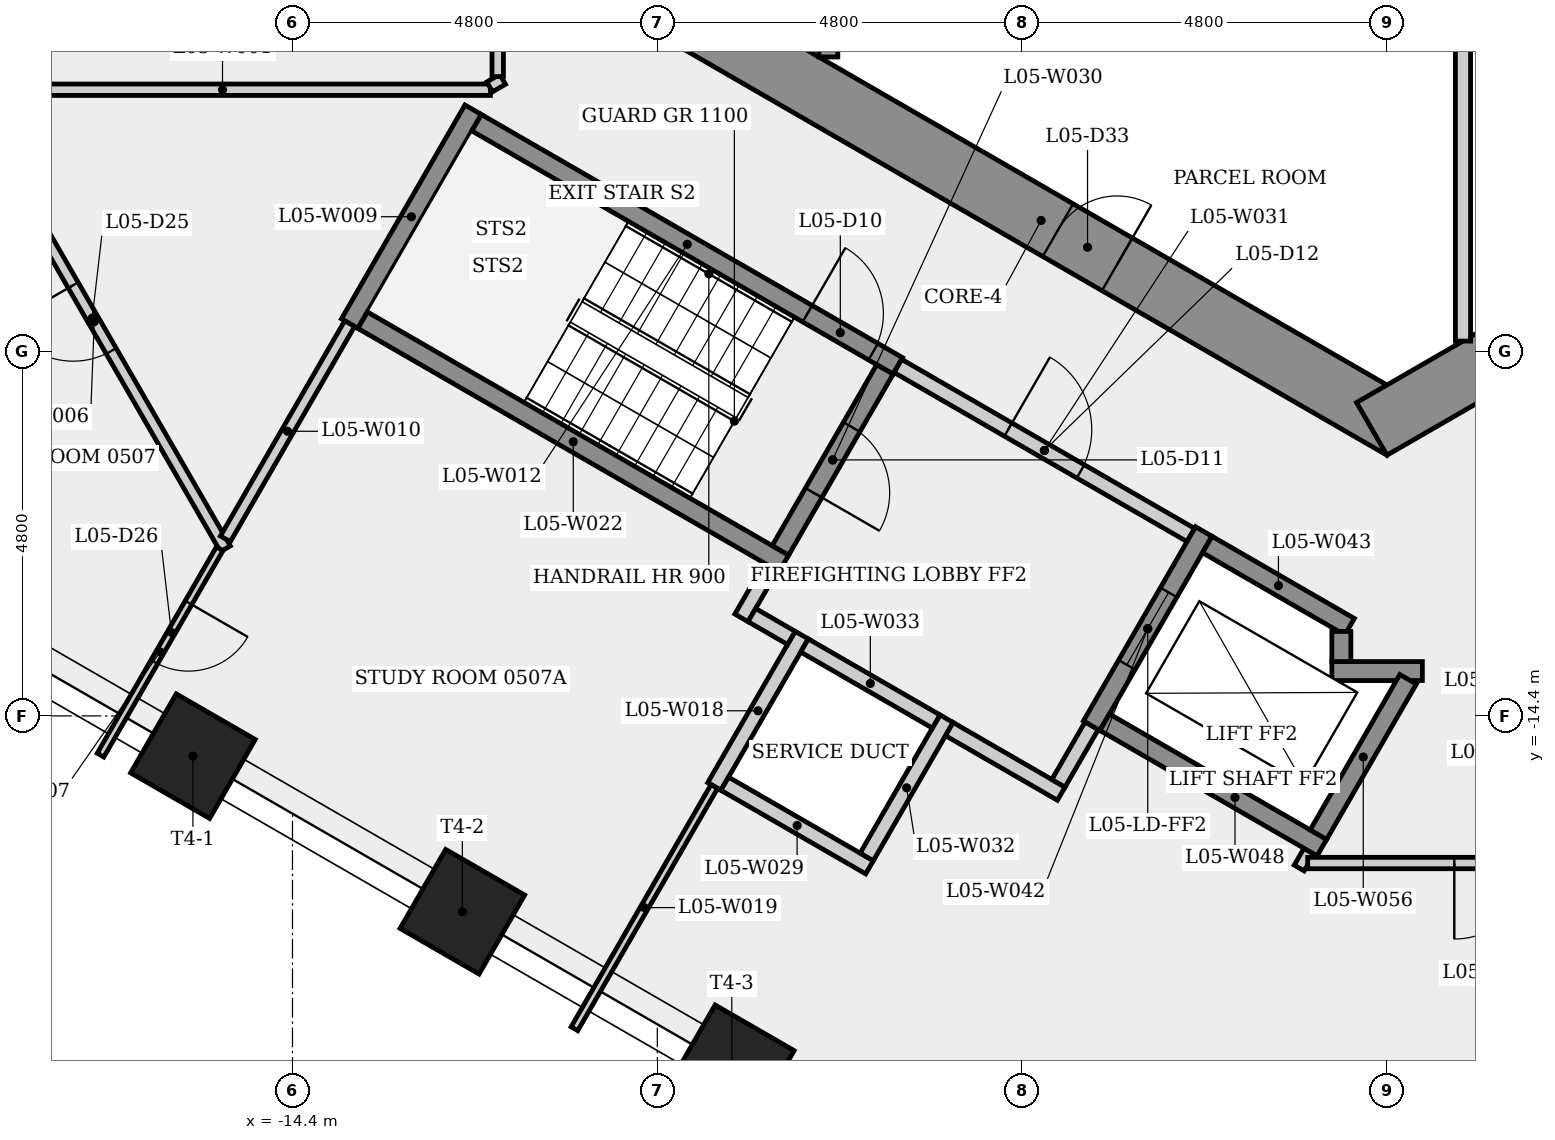
"""IFC4 building model, lengths in metres.
Left out: names, types, materials, properties, quantities, classifications, styles, units other than length and angle.
Written with IfcOpenShell. Run it as: python <this file> out.ifc"""

import sys

from ifc_helpers import new_model, si_unit, direction, frame, frame_2d, origin, origin_2d, place, context, subcontext, project, spatial, rectangle, extrude, element, fill, save


model = new_model("IFC4")
c1 = context("Model", 3, precision=1e-05, world=origin(), true_north=direction((0.0, 1.0)))
c2 = subcontext(c1, "Body", "Model", "MODEL_VIEW")
j1 = project(units=[si_unit("LENGTHUNIT", "METRE"), si_unit("PLANEANGLEUNIT", "RADIAN")], contexts=[c1])
p1 = place(None, origin())
s1 = spatial("IfcSite", under=j1, at=p1, CompositionType="ELEMENT")
p2 = place(p1, origin())
s2 = spatial("IfcBuilding", under=s1, at=p2, CompositionType="ELEMENT")
p3 = place(p2, frame((0.0, 0.0, 25.5)))
s3 = spatial("IfcBuildingStorey", under=s2, at=p3, CompositionType="ELEMENT", Elevation=25.5)
p4 = place(p3, frame((-9.3, -5.138, 0.0), z_axis=(0.0, 0.0, 1.0), x_axis=(0.866023993627, -0.500002442456, 0.0)))
e1 = element("IfcWall", 1, at=p4, inside=s3, PredefinedType="SHEAR", context=c2, shape_type="SweptSolid", body=[
    extrude(rectangle(XDim=10.97, YDim=0.8, at=frame_2d((5.485, 0.0))), origin(), (0.0, 0.0, 1.0), 3.4),
])
p5 = place(p4, frame((5.74, 0.0, 0.0)))
e2 = element("IfcOpeningElement", 2, at=p5, cuts=e1, PredefinedType="OPENING", context=c2, shape_type="SweptSolid", body=[
    extrude(rectangle(XDim=0.9, YDim=2.1, at=frame_2d((0.45, 1.05))), frame((0.0, 0.41, 0.0), z_axis=(0.0, -1.0, 0.0), x_axis=(1.0, 0.0, 0.0)), (0.0, 0.0, 1.0), 0.82),
])
p6 = place(p3, frame((-0.2, -10.623, 0.0), z_axis=(0.0, 0.0, 1.0), x_axis=(0.866023993627, 0.500002442456, 0.0)))
e3 = element("IfcWall", 3, at=p6, inside=s3, PredefinedType="SHEAR", context=c2, shape_type="SweptSolid", body=[
    extrude(rectangle(XDim=10.97, YDim=0.8, at=frame_2d((5.485, 0.0))), origin(), (0.0, 0.0, 1.0), 3.4),
])
p7 = place(p6, frame((7.224, 0.0, 0.0)))
e4 = element("IfcOpeningElement", 4, at=p7, cuts=e3, PredefinedType="OPENING", context=c2, shape_type="SweptSolid", body=[
    extrude(rectangle(XDim=0.9, YDim=2.1, at=frame_2d((0.45, 1.05))), frame((0.0, 0.41, 0.0), z_axis=(0.0, -1.0, 0.0), x_axis=(1.0, 0.0, 0.0)), (0.0, 0.0, 1.0), 0.82),
])
for number, where, z_axis, x_axis in (
    (5, (-15.71, -14.93, 0.0), (0.0, 0.0, 1.0), (-0.5, -0.866, 0.0)),
    (6, (-12.165, -16.977, 0.0), (0.0, 0.0, 1.0), (-0.5, -0.866, 0.0)),
    (7, (-8.62, -19.023, 0.0), (0.0, 0.0, 1.0), (-0.5, -0.866, 0.0)),
):
    element("IfcColumn", number, at=place(p3, frame(where, z_axis=z_axis, x_axis=x_axis)), inside=s3, PredefinedType="COLUMN", context=c2, shape_type="SweptSolid", body=[
        extrude(rectangle(XDim=1.2, YDim=1.2, at=origin_2d()), origin(), (0.0, 0.0, 1.0), 3.4),
    ])
p8 = place(p3, frame((-18.845, -6.161, 0.0), z_axis=(0.0, 0.0, 1.0), x_axis=(1.0, 0.0, 0.0)))
e8 = element("IfcWall", 8, at=p8, inside=s3, PredefinedType="PARTITIONING", context=c2, shape_type="SweptSolid", body=[
    extrude(rectangle(XDim=7.049, YDim=0.15, at=frame_2d((3.525, 0.0))), origin(), (0.0, 0.0, 1.0), 3.05),
])
p9 = place(p3, frame((-15.283, -12.201, 0.0), z_axis=(0.0, 0.0, 1.0), x_axis=(-0.500009345598, 0.866020008033, 0.0)))
e9 = element("IfcWall", 9, at=p9, inside=s3, PredefinedType="PARTITIONING", context=c2, shape_type="SweptSolid", body=[
    extrude(rectangle(XDim=6.9, YDim=0.15, at=frame_2d((3.45, 0.0))), origin(), (0.0, 0.0, 1.0), 3.05),
])
p10 = place(p9, frame((3.005, 0.0, 0.0)))
e10 = element("IfcOpeningElement", 10, at=p10, cuts=e9, PredefinedType="OPENING", context=c2, shape_type="SweptSolid", body=[
    extrude(rectangle(XDim=1.0, YDim=2.1, at=frame_2d((0.5, 1.05))), frame((0.0, 0.085, 0.0), z_axis=(0.0, -1.0, 0.0), x_axis=(1.0, 0.0, 0.0)), (0.0, 0.0, 1.0), 0.17),
])
p11 = place(p3, frame((-15.358, -12.201, 0.0), z_axis=(0.0, 0.0, 1.0), x_axis=(-0.500041479787, -0.866001454094, 0.0)))
e11 = element("IfcWall", 11, at=p11, inside=s3, PredefinedType="PARTITIONING", context=c2, shape_type="SweptSolid", body=[
    extrude(rectangle(XDim=3.135, YDim=0.1, at=frame_2d((1.568, 0.0))), origin(), (0.0, 0.0, 1.0), 3.05),
])
p12 = place(p11, frame((0.82, 0.0, 0.0)))
e12 = element("IfcOpeningElement", 12, at=p12, cuts=e11, PredefinedType="OPENING", context=c2, shape_type="SweptSolid", body=[
    extrude(rectangle(XDim=0.9, YDim=2.1, at=frame_2d((0.45, 1.05))), frame((0.0, 0.06, 0.0), z_axis=(0.0, -1.0, 0.0), x_axis=(1.0, 0.0, 0.0)), (0.0, 0.0, 1.0), 0.12),
])
p13 = place(p3, frame((-13.648, -9.239, 0.0), z_axis=(0.0, 0.0, 1.0), x_axis=(0.500017246033, 0.866015446554, 0.0)))
e13 = element("IfcWall", 13, at=p13, inside=s3, PredefinedType="SHEAR", context=c2, shape_type="SweptSolid", body=[
    extrude(rectangle(XDim=3.25, YDim=0.25, at=frame_2d((1.625, 0.0))), origin(), (0.0, 0.0, 1.0), 3.05),
])
p14 = place(p3, frame((-13.648, -9.239, 0.0), z_axis=(0.0, 0.0, 1.0), x_axis=(-0.50004125829, -0.866001581989, 0.0)))
e14 = element("IfcWall", 14, at=p14, inside=s3, PredefinedType="PARTITIONING", context=c2, shape_type="SweptSolid", body=[
    extrude(rectangle(XDim=3.27, YDim=0.15, at=frame_2d((1.635, 0.0))), origin(), (0.0, 0.0, 1.0), 3.05),
])
p15 = place(p3, frame((-11.977, -6.595, 0.0), z_axis=(0.0, 0.0, 1.0), x_axis=(0.866025499775, -0.499999833739, 0.0)))
e15 = element("IfcWall", 15, at=p15, inside=s3, PredefinedType="SHEAR", context=c2, shape_type="SweptSolid", body=[
    extrude(rectangle(XDim=6.4, YDim=0.25, at=frame_2d((3.2, 0.0))), origin(), (0.0, 0.0, 1.0), 3.05),
])
p16 = place(p15, frame((5.025, 0.0, 0.0)))
e16 = element("IfcOpeningElement", 16, at=p16, cuts=e15, PredefinedType="OPENING", context=c2, shape_type="SweptSolid", body=[
    extrude(rectangle(XDim=1.0, YDim=2.1, at=frame_2d((0.5, 1.05))), frame((0.0, 0.135, 0.0), z_axis=(0.0, -1.0, 0.0), x_axis=(1.0, 0.0, 0.0)), (0.0, 0.0, 1.0), 0.27),
])
p17 = place(p3, frame((-11.806, -6.123, 0.0), z_axis=(0.0, 0.0, 1.0), x_axis=(0.866103179807, 0.499865263774, 0.0)))
e17 = element("IfcWall", 17, at=p17, inside=s3, PredefinedType="PARTITIONING", context=c2, shape_type="SweptSolid", body=[
    extrude(rectangle(XDim=0.197, YDim=0.15, at=frame_2d((0.099, 0.0))), origin(), (0.0, 0.0, 1.0), 3.05),
])
p18 = place(p3, frame((-11.7, -5.987, 0.0), z_axis=(0.0, 0.0, 1.0), x_axis=(0.0, 1.0, 0.0)))
e18 = element("IfcWall", 18, at=p18, inside=s3, PredefinedType="PARTITIONING", context=c2, shape_type="SweptSolid", body=[
    extrude(rectangle(XDim=11.732, YDim=0.15, at=frame_2d((5.866, 0.0))), origin(), (0.0, 0.0, 1.0), 3.05),
])
p19 = place(p18, frame((5.366, 0.0, 0.0)))
e19 = element("IfcOpeningElement", 19, at=p19, cuts=e18, PredefinedType="OPENING", context=c2, shape_type="SweptSolid", body=[
    extrude(rectangle(XDim=1.0, YDim=2.1, at=frame_2d((0.5, 1.05))), frame((0.0, 0.085, 0.0), z_axis=(0.0, -1.0, 0.0), x_axis=(1.0, 0.0, 0.0)), (0.0, 0.0, 1.0), 0.17),
])
p20 = place(p3, frame((-8.85, -15.329, 0.0), z_axis=(0.0, 0.0, 1.0), x_axis=(0.500077740698, 0.865980515519, 0.0)))
e20 = element("IfcWall", 20, at=p20, inside=s3, PredefinedType="PLUMBINGWALL", context=c2, shape_type="SweptSolid", body=[
    extrude(rectangle(XDim=2.3, YDim=0.2, at=frame_2d((1.15, 0.0))), origin(), (0.0, 0.0, 1.0), 3.05),
])
p21 = place(p3, frame((-8.85, -15.329, 0.0), z_axis=(0.0, 0.0, 1.0), x_axis=(-0.499955964762, -0.866050826049, 0.0)))
e21 = element("IfcWall", 21, at=p21, inside=s3, PredefinedType="PARTITIONING", context=c2, shape_type="SweptSolid", body=[
    extrude(rectangle(XDim=3.68, YDim=0.1, at=frame_2d((1.84, 0.0))), origin(), (0.0, 0.0, 1.0), 3.05),
])
p22 = place(p3, frame((-8.493, -13.11, 0.0), z_axis=(0.0, 0.0, 1.0), x_axis=(0.500067724834, 0.865986299303, 0.0)))
e22 = element("IfcWall", 22, at=p22, inside=s3, PredefinedType="PARTITIONING", context=c2, shape_type="SweptSolid", body=[
    extrude(rectangle(XDim=0.775, YDim=0.2, at=frame_2d((0.388, 0.0))), origin(), (0.0, 0.0, 1.0), 3.05),
])
p23 = place(p3, frame((-7.935, -12.393, 0.0), z_axis=(0.0, 0.0, 1.0), x_axis=(-0.866025499775, 0.499999833739, 0.0)))
e23 = element("IfcWall", 23, at=p23, inside=s3, PredefinedType="SHEAR", context=c2, shape_type="SweptSolid", body=[
    extrude(rectangle(XDim=6.4, YDim=0.25, at=frame_2d((3.2, 0.0))), origin(), (0.0, 0.0, 1.0), 3.05),
])
p24 = place(p3, frame((-7.836, -13.373, 0.0), z_axis=(0.0, 0.0, 1.0), x_axis=(-0.866232998003, 0.499640263761, 0.0)))
e24 = element("IfcWall", 24, at=p24, inside=s3, PredefinedType="PARTITIONING", context=c2, shape_type="SweptSolid", body=[
    extrude(rectangle(XDim=0.6, YDim=0.2, at=frame_2d((0.3, 0.0))), origin(), (0.0, 0.0, 1.0), 3.05),
])
p25 = place(p3, frame((-7.35, -5.73, 0.0), z_axis=(0.0, 0.0, 1.0), x_axis=(0.0, 1.0, 0.0)))
e25 = element("IfcWall", 25, at=p25, inside=s3, PredefinedType="SHEAR", context=c2, shape_type="SweptSolid", body=[
    extrude(rectangle(XDim=4.055, YDim=0.25, at=frame_2d((2.028, 0.0))), origin(), (0.0, 0.0, 1.0), 3.05),
])
p26 = place(p3, frame((-6.808, -16.392, 0.0), z_axis=(0.0, 0.0, 1.0), x_axis=(-0.866008176907, 0.50002983664, 0.0)))
e26 = element("IfcWall", 26, at=p26, inside=s3, PredefinedType="PLUMBINGWALL", context=c2, shape_type="SweptSolid", body=[
    extrude(rectangle(XDim=2.2, YDim=0.2, at=frame_2d((1.1, 0.0))), origin(), (0.0, 0.0, 1.0), 3.05),
])
p27 = place(p3, frame((-6.605, -9.841, 0.0), z_axis=(0.0, 0.0, 1.0), x_axis=(-0.499996545922, -0.866027397988, 0.0)))
e27 = element("IfcWall", 27, at=p27, inside=s3, PredefinedType="SHEAR", context=c2, shape_type="SweptSolid", body=[
    extrude(rectangle(XDim=2.75, YDim=0.25, at=frame_2d((1.375, 0.0))), origin(), (0.0, 0.0, 1.0), 3.05),
])
p28 = place(p27, frame((0.875, 0.0, 0.0)))
e28 = element("IfcOpeningElement", 28, at=p28, cuts=e27, PredefinedType="OPENING", context=c2, shape_type="SweptSolid", body=[
    extrude(rectangle(XDim=1.0, YDim=2.1, at=frame_2d((0.5, 1.05))), frame((0.0, 0.135, 0.0), z_axis=(0.0, -1.0, 0.0), x_axis=(1.0, 0.0, 0.0)), (0.0, 0.0, 1.0), 0.27),
])
p29 = place(p3, frame((-6.435, -9.795, 0.0), z_axis=(0.0, 0.0, 1.0), x_axis=(0.866012907634, -0.500021643343, 0.0)))
e29 = element("IfcWall", 29, at=p29, inside=s3, PredefinedType="PARTITIONING", context=c2, shape_type="SweptSolid", body=[
    extrude(rectangle(XDim=4.45, YDim=0.2, at=frame_2d((2.225, 0.0))), origin(), (0.0, 0.0, 1.0), 3.05),
])
p30 = place(p29, frame((1.675, 0.0, 0.0)))
e30 = element("IfcOpeningElement", 30, at=p30, cuts=e29, PredefinedType="OPENING", context=c2, shape_type="SweptSolid", body=[
    extrude(rectangle(XDim=1.1, YDim=2.1, at=frame_2d((0.55, 1.05))), frame((0.0, 0.11, 0.0), z_axis=(0.0, -1.0, 0.0), x_axis=(1.0, 0.0, 0.0)), (0.0, 0.0, 1.0), 0.22),
])
p31 = place(p3, frame((-5.795, -14.437, 0.0), z_axis=(0.0, 0.0, 1.0), x_axis=(-0.500027713859, -0.866009402589, 0.0)))
e31 = element("IfcWall", 31, at=p31, inside=s3, PredefinedType="PLUMBINGWALL", context=c2, shape_type="SweptSolid", body=[
    extrude(rectangle(XDim=2.1, YDim=0.2, at=frame_2d((1.05, 0.0))), origin(), (0.0, 0.0, 1.0), 3.05),
])
p32 = place(p3, frame((-5.931, -14.473, 0.0), z_axis=(0.0, 0.0, 1.0), x_axis=(-0.866041268327, 0.499972520799, 0.0)))
e32 = element("IfcWall", 32, at=p32, inside=s3, PredefinedType="PLUMBINGWALL", context=c2, shape_type="SweptSolid", body=[
    extrude(rectangle(XDim=2.0, YDim=0.2, at=frame_2d((1.0, 0.0))), origin(), (0.0, 0.0, 1.0), 3.05),
])
p33 = place(p3, frame((-4.286, -15.423, 0.0), z_axis=(0.0, 0.0, 1.0), x_axis=(-0.866025371046, 0.500000056704, 0.0)))
e33 = element("IfcWall", 33, at=p33, inside=s3, PredefinedType="PARTITIONING", context=c2, shape_type="SweptSolid", body=[
    extrude(rectangle(XDim=1.7, YDim=0.2, at=frame_2d((0.85, 0.0))), origin(), (0.0, 0.0, 1.0), 3.05),
])
p34 = place(p3, frame((-3.885, -14.529, 0.0), z_axis=(0.0, 0.0, 1.0), x_axis=(-0.499859285417, -0.866106630146, 0.0)))
e34 = element("IfcWall", 34, at=p34, inside=s3, PredefinedType="PARTITIONING", context=c2, shape_type="SweptSolid", body=[
    extrude(rectangle(XDim=0.875, YDim=0.2, at=frame_2d((0.438, 0.0))), origin(), (0.0, 0.0, 1.0), 3.05),
])
p35 = place(p3, frame((-2.41, -11.974, 0.0), z_axis=(0.0, 0.0, 1.0), x_axis=(-0.500001826776, -0.866024349092, 0.0)))
e35 = element("IfcWall", 35, at=p35, inside=s3, PredefinedType="SHEAR", context=c2, shape_type="SweptSolid", body=[
    extrude(rectangle(XDim=2.95, YDim=0.25, at=frame_2d((1.475, 0.0))), origin(), (0.0, 0.0, 1.0), 3.05),
])
p36 = place(p35, frame((0.925, 0.0, 0.0)))
e36 = element("IfcOpeningElement", 36, at=p36, cuts=e35, PredefinedType="OPENING", context=c2, shape_type="SweptSolid", body=[
    extrude(rectangle(XDim=1.1, YDim=2.1, at=frame_2d((0.55, 1.05))), frame((0.0, 0.135, 0.0), z_axis=(0.0, -1.0, 0.0), x_axis=(1.0, 0.0, 0.0)), (0.0, 0.0, 1.0), 0.27),
])
p37 = place(p3, frame((-2.364, -12.145, 0.0), z_axis=(0.0, 0.0, 1.0), x_axis=(0.86603892542, -0.499976579108, 0.0)))
e37 = element("IfcWall", 37, at=p37, inside=s3, PredefinedType="SHEAR", context=c2, shape_type="SweptSolid", body=[
    extrude(rectangle(XDim=2.162, YDim=0.25, at=frame_2d((1.081, 0.0))), origin(), (0.0, 0.0, 1.0), 3.05),
])
p38 = place(p3, frame((-1.155, -16.401, 0.0), z_axis=(0.0, 0.0, 1.0), x_axis=(0.500134748329, 0.865947592822, 0.0)))
e38 = element("IfcWall", 38, at=p38, inside=s3, PredefinedType="PARTITIONING", context=c2, shape_type="SweptSolid", body=[
    extrude(rectangle(XDim=0.256, YDim=0.15, at=frame_2d((0.128, 0.0))), origin(), (0.0, 0.0, 1.0), 3.05),
])
p39 = place(p3, frame((-0.856, -16.133, 0.0), z_axis=(0.0, 0.0, 1.0), x_axis=(-0.866021716278, 0.500006386895, 0.0)))
e39 = element("IfcWall", 39, at=p39, inside=s3, PredefinedType="SHEAR", context=c2, shape_type="SweptSolid", body=[
    extrude(rectangle(XDim=3.3, YDim=0.25, at=frame_2d((1.65, 0.0))), origin(), (0.0, 0.0, 1.0), 3.05),
])
p40 = place(p3, frame((-0.725, -13.81, 0.0), z_axis=(0.0, 0.0, 1.0), x_axis=(1.0, 0.0, 0.0)))
e40 = element("IfcWall", 40, at=p40, inside=s3, PredefinedType="SHEAR", context=c2, shape_type="SweptSolid", body=[
    extrude(rectangle(XDim=1.191, YDim=0.25, at=frame_2d((0.595, 0.0))), origin(), (0.0, 0.0, 1.0), 3.05),
])
p41 = place(p3, frame((-0.6, -13.289, 0.0), z_axis=(0.0, 0.0, 1.0), x_axis=(0.0, -1.0, 0.0)))
e41 = element("IfcWall", 41, at=p41, inside=s3, PredefinedType="SHEAR", context=c2, shape_type="SweptSolid", body=[
    extrude(rectangle(XDim=0.396, YDim=0.25, at=frame_2d((0.198, 0.0))), origin(), (0.0, 0.0, 1.0), 3.4),
])
p42 = place(p3, frame((0.278, -13.918, 0.0), z_axis=(0.0, 0.0, 1.0), x_axis=(-0.49998806882, -0.866032292145, 0.0)))
e42 = element("IfcWall", 42, at=p42, inside=s3, PredefinedType="SHEAR", context=c2, shape_type="SweptSolid", body=[
    extrude(rectangle(XDim=2.36, YDim=0.25, at=frame_2d((1.18, 0.0))), origin(), (0.0, 0.0, 1.0), 3.4),
])
p43 = place(p3, frame((1.0, -5.275, 0.0), z_axis=(0.0, 0.0, 1.0), x_axis=(0.0, -1.0, 0.0)))
e43 = element("IfcWall", 43, at=p43, inside=s3, PredefinedType="PARTITIONING", context=c2, shape_type="SweptSolid", body=[
    extrude(rectangle(XDim=4.194, YDim=0.2, at=frame_2d((2.097, 0.0))), origin(), (0.0, 0.0, 1.0), 3.05),
])
p44 = place(p3, frame((3.814, -16.336, 0.0), z_axis=(0.0, 0.0, 1.0), x_axis=(-1.0, 0.0, 0.0)))
e44 = element("IfcWall", 44, at=p44, inside=s3, PredefinedType="PARTITIONING", context=c2, shape_type="SweptSolid", body=[
    extrude(rectangle(XDim=4.857, YDim=0.15, at=frame_2d((2.428, 0.0))), origin(), (0.0, 0.0, 1.0), 3.05),
])
p45 = place(p44, frame((1.928, 0.0, 0.0)))
e45 = element("IfcOpeningElement", 45, at=p45, cuts=e44, PredefinedType="OPENING", context=c2, shape_type="SweptSolid", body=[
    extrude(rectangle(XDim=1.0, YDim=2.1, at=frame_2d((0.5, 1.05))), frame((0.0, 0.085, 0.0), z_axis=(0.0, -1.0, 0.0), x_axis=(1.0, 0.0, 0.0)), (0.0, 0.0, 1.0), 0.17),
])
p46 = place(p16, origin())
e46 = element("IfcDoor", 46, at=p46, inside=s3, OperationType="SINGLE_SWING_LEFT", PredefinedType="DOOR", context=c2, shape_type="SweptSolid", body=[
    extrude(rectangle(XDim=1.0, YDim=2.1, at=frame_2d((0.5, 1.05))), frame((0.0, 0.025, 0.0), z_axis=(0.0, -1.0, 0.0), x_axis=(1.0, 0.0, 0.0)), (0.0, 0.0, 1.0), 0.05),
])
fill(e16, e46)
p47 = place(p28, origin())
e47 = element("IfcDoor", 47, at=p47, inside=s3, OperationType="SINGLE_SWING_RIGHT", PredefinedType="DOOR", context=c2, shape_type="SweptSolid", body=[
    extrude(rectangle(XDim=1.0, YDim=2.1, at=frame_2d((0.5, 1.05))), frame((0.0, 0.025, 0.0), z_axis=(0.0, -1.0, 0.0), x_axis=(1.0, 0.0, 0.0)), (0.0, 0.0, 1.0), 0.05),
])
fill(e28, e47)
p48 = place(p30, origin())
e48 = element("IfcDoor", 48, at=p48, inside=s3, OperationType="SINGLE_SWING_LEFT", PredefinedType="DOOR", context=c2, shape_type="SweptSolid", body=[
    extrude(rectangle(XDim=1.1, YDim=2.1, at=frame_2d((0.55, 1.05))), frame((0.0, 0.025, 0.0), z_axis=(0.0, -1.0, 0.0), x_axis=(1.0, 0.0, 0.0)), (0.0, 0.0, 1.0), 0.05),
])
fill(e30, e48)
p49 = place(p36, origin())
e49 = element("IfcDoor", 49, at=p49, inside=s3, OperationType="SLIDING_TO_LEFT", PredefinedType="DOOR", context=c2, shape_type="SweptSolid", body=[
    extrude(rectangle(XDim=1.1, YDim=2.1, at=frame_2d((0.55, 1.05))), frame((0.0, 0.025, 0.0), z_axis=(0.0, -1.0, 0.0), x_axis=(1.0, 0.0, 0.0)), (0.0, 0.0, 1.0), 0.05),
])
fill(e36, e49)
p50 = place(p10, origin())
e50 = element("IfcDoor", 50, at=p50, inside=s3, OperationType="SINGLE_SWING_RIGHT", PredefinedType="DOOR", context=c2, shape_type="SweptSolid", body=[
    extrude(rectangle(XDim=1.0, YDim=2.1, at=frame_2d((0.5, 1.05))), frame((0.0, 0.025, 0.0), z_axis=(0.0, -1.0, 0.0), x_axis=(1.0, 0.0, 0.0)), (0.0, 0.0, 1.0), 0.05),
])
fill(e10, e50)
p51 = place(p12, origin())
e51 = element("IfcDoor", 51, at=p51, inside=s3, OperationType="SINGLE_SWING_LEFT", PredefinedType="DOOR", context=c2, shape_type="SweptSolid", body=[
    extrude(rectangle(XDim=0.9, YDim=2.1, at=frame_2d((0.45, 1.05))), frame((0.0, 0.025, 0.0), z_axis=(0.0, -1.0, 0.0), x_axis=(1.0, 0.0, 0.0)), (0.0, 0.0, 1.0), 0.05),
])
fill(e12, e51)
p52 = place(p45, origin())
e52 = element("IfcDoor", 52, at=p52, inside=s3, OperationType="SINGLE_SWING_RIGHT", PredefinedType="DOOR", context=c2, shape_type="SweptSolid", body=[
    extrude(rectangle(XDim=1.0, YDim=2.1, at=frame_2d((0.5, 1.05))), frame((0.0, 0.025, 0.0), z_axis=(0.0, -1.0, 0.0), x_axis=(1.0, 0.0, 0.0)), (0.0, 0.0, 1.0), 0.05),
])
fill(e45, e52)
p53 = place(p5, origin())
e53 = element("IfcDoor", 53, at=p53, inside=s3, OperationType="SINGLE_SWING_RIGHT", PredefinedType="DOOR", context=c2, shape_type="SweptSolid", body=[
    extrude(rectangle(XDim=0.9, YDim=2.1, at=frame_2d((0.45, 1.05))), frame((0.0, 0.025, 0.0), z_axis=(0.0, -1.0, 0.0), x_axis=(1.0, 0.0, 0.0)), (0.0, 0.0, 1.0), 0.05),
])
fill(e2, e53)
save(model, sys.argv[1])
